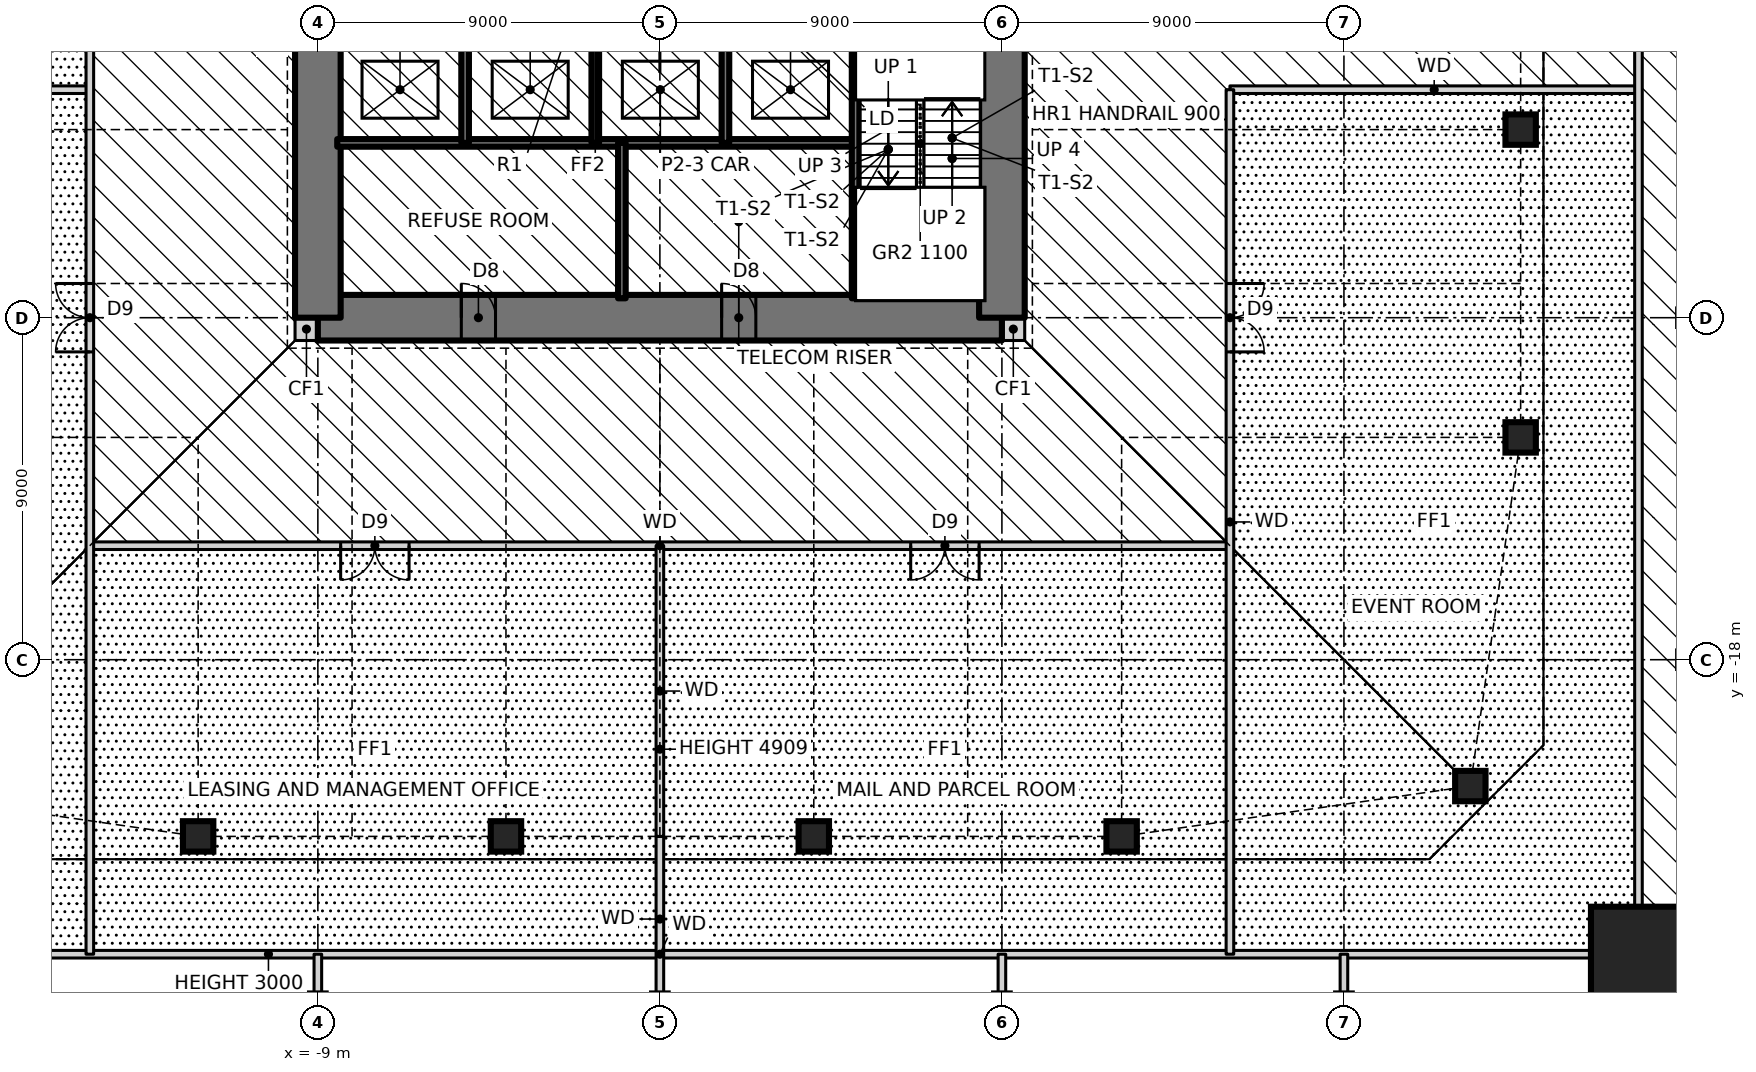
"""IFC4 building model, lengths in metres.
Left out: names, types, materials, properties, quantities, classifications, styles, units other than length and angle.
Written with IfcOpenShell. Run it as: python <this file> out.ifc"""

import sys

from ifc_helpers import new_model, si_unit, direction, frame, frame_2d, origin, origin_2d, place, context, subcontext, project, spatial, rectangle, hollow_rectangle, i_section, extrude, element, fill, save


model = new_model("IFC4")
c1 = context("Model", 3, precision=1e-05, world=origin(), true_north=direction((0.0, 1.0)))
c2 = subcontext(c1, "Body", "Model", "MODEL_VIEW")
j1 = project(units=[si_unit("LENGTHUNIT", "METRE"), si_unit("PLANEANGLEUNIT", "RADIAN")], contexts=[c1])
p1 = place(None, origin())
s1 = spatial("IfcSite", under=j1, at=p1, CompositionType="ELEMENT")
p2 = place(p1, origin())
s2 = spatial("IfcBuilding", under=s1, at=p2, CompositionType="ELEMENT")
p3 = place(p2, origin())
s3 = spatial("IfcBuildingStorey", under=s2, at=p3, CompositionType="ELEMENT", Elevation=0.0)
for number, where, z_axis, x_axis in (
    (1, (-12.15, -22.65, 0.0), (0.0, 0.0, 1.0), (1.0, 0.0, 0.0)),
    (2, (-4.05, -22.65, 0.0), (0.0, 0.0, 1.0), (1.0, 0.0, 0.0)),
    (3, (4.05, -22.65, 0.0), (0.0, 0.0, 1.0), (1.0, 0.0, 0.0)),
    (4, (12.15, -22.65, 0.0), (0.0, 0.0, 1.0), (1.0, 0.0, 0.0)),
    (5, (21.326, -21.326, 0.0), (0.0, 0.0, 1.0), (1.0, 0.0, 0.0)),
    (6, (22.65, -12.15, 0.0), (0.0, 0.0, 1.0), (1.0, 0.0, 0.0)),
    (7, (22.65, -4.05, 0.0), (0.0, 0.0, 1.0), (1.0, 0.0, 0.0)),
):
    element("IfcColumn", number, at=place(p3, frame(where, z_axis=z_axis, x_axis=x_axis)), inside=s3, PredefinedType="COLUMN", context=c2, shape_type="SweptSolid", body=[
        extrude(hollow_rectangle(XDim=0.8, YDim=0.8, WallThickness=0.09, at=origin_2d()), origin(), (0.0, 0.0, 1.0), 6.0),
    ])
p4 = place(p3, frame((27.0, -27.0, 0.0), z_axis=(0.0, 0.0, 1.0), x_axis=(1.0, 0.0, 0.0)))
e8 = element("IfcColumn", 8, at=p4, inside=s3, PredefinedType="COLUMN", context=c2, shape_type="SweptSolid", body=[
    extrude(rectangle(XDim=5.0, YDim=5.0, at=origin_2d()), origin(), (0.0, 0.0, 1.0), 6.0),
    extrude(i_section(OverallWidth=0.478, OverallDepth=0.599, WebThickness=0.1, FlangeThickness=0.14, at=origin_2d()), origin(), (0.0, 0.0, 1.0), 6.0),
])
for number, where, z_axis, x_axis in (
    (9, (-9.6, -9.3, 0.0), (0.0, 0.0, 1.0), (1.0, 0.0, 0.0)),
    (10, (9.0, -9.3, 0.0), (0.0, 0.0, 1.0), (1.0, 0.0, 0.0)),
):
    element("IfcWall", number, at=place(p3, frame(where, z_axis=z_axis, x_axis=x_axis)), inside=s3, PredefinedType="SOLIDWALL", context=c2, shape_type="SweptSolid", body=[
        extrude(rectangle(XDim=0.6, YDim=0.6, at=frame_2d((0.3, 0.0))), origin(), (0.0, 0.0, 1.0), 6.0),
    ])
p5 = place(p3, frame((-9.0, -9.0, 0.0), z_axis=(0.0, 0.0, 1.0), x_axis=(1.0, 0.0, 0.0)))
e11 = element("IfcWall", 11, at=p5, inside=s3, PredefinedType="SHEAR", context=c2, shape_type="SweptSolid", body=[
    extrude(rectangle(XDim=18.0, YDim=1.2, at=frame_2d((9.0, 0.0))), origin(), (0.0, 0.0, 1.0), 6.0),
])
p6 = place(p5, frame((3.775, 0.0, 0.0)))
e12 = element("IfcOpeningElement", 12, at=p6, cuts=e11, PredefinedType="OPENING", context=c2, shape_type="SweptSolid", body=[
    extrude(rectangle(XDim=0.9, YDim=2.1, at=frame_2d((0.45, 1.05))), frame((0.0, 0.61, 0.0), z_axis=(0.0, -1.0, 0.0), x_axis=(1.0, 0.0, 0.0)), (0.0, 0.0, 1.0), 1.22),
])
p7 = place(p5, frame((10.625, 0.0, 0.0)))
e13 = element("IfcOpeningElement", 13, at=p7, cuts=e11, PredefinedType="OPENING", context=c2, shape_type="SweptSolid", body=[
    extrude(rectangle(XDim=0.9, YDim=2.1, at=frame_2d((0.45, 1.05))), frame((0.0, 0.61, 0.0), z_axis=(0.0, -1.0, 0.0), x_axis=(1.0, 0.0, 0.0)), (0.0, 0.0, 1.0), 1.22),
])
p8 = place(p3, frame((9.0, -9.0, 0.0), z_axis=(0.0, 0.0, 1.0), x_axis=(0.0, 1.0, 0.0)))
e14 = element("IfcWall", 14, at=p8, inside=s3, PredefinedType="SHEAR", context=c2, shape_type="SweptSolid", body=[
    extrude(rectangle(XDim=18.0, YDim=1.2, at=frame_2d((9.0, 0.0))), origin(), (0.0, 0.0, 1.0), 6.0),
])
p9 = place(p8, frame((8.5, 0.0, 0.0)))
e15 = element("IfcOpeningElement", 15, at=p9, cuts=e14, PredefinedType="OPENING", context=c2, shape_type="SweptSolid", body=[
    extrude(rectangle(XDim=1.0, YDim=2.1, at=frame_2d((0.5, 1.05))), frame((0.0, 0.61, 0.0), z_axis=(0.0, -1.0, 0.0), x_axis=(1.0, 0.0, 0.0)), (0.0, 0.0, 1.0), 1.22),
])
p10 = place(p3, frame((-9.0, 9.0, 0.0), z_axis=(0.0, 0.0, 1.0), x_axis=(0.0, -1.0, 0.0)))
e16 = element("IfcWall", 16, at=p10, inside=s3, PredefinedType="SHEAR", context=c2, shape_type="SweptSolid", body=[
    extrude(rectangle(XDim=18.0, YDim=1.2, at=frame_2d((9.0, 0.0))), origin(), (0.0, 0.0, 1.0), 6.0),
])
p11 = place(p10, frame((8.5, 0.0, 0.0)))
e17 = element("IfcOpeningElement", 17, at=p11, cuts=e16, PredefinedType="OPENING", context=c2, shape_type="SweptSolid", body=[
    extrude(rectangle(XDim=1.0, YDim=2.1, at=frame_2d((0.5, 1.05))), frame((0.0, 0.61, 0.0), z_axis=(0.0, -1.0, 0.0), x_axis=(1.0, 0.0, 0.0)), (0.0, 0.0, 1.0), 1.22),
])
p12 = place(p3, frame((-25.75, -25.75, 0.0), z_axis=(0.0, 0.0, 1.0), x_axis=(1.0, 0.0, 0.0)))
e18 = element("IfcWall", 18, at=p12, inside=s3, PredefinedType="SOLIDWALL", context=c2, shape_type="SweptSolid", body=[
    extrude(rectangle(XDim=51.5, YDim=0.2, at=frame_2d((25.75, 0.0))), origin(), (0.0, 0.0, 1.0), 3.0),
])
p13 = place(p3, frame((-15.0, -15.0, 0.0), z_axis=(0.0, 0.0, 1.0), x_axis=(1.0, 0.0, 0.0)))
e19 = element("IfcWall", 19, at=p13, inside=s3, PredefinedType="SOLIDWALL", context=c2, shape_type="SweptSolid", body=[
    extrude(rectangle(XDim=30.0, YDim=0.2, at=frame_2d((15.0, 0.0))), origin(), (0.0, 0.0, 1.0), 5.75),
])
p14 = place(p13, frame((6.6, 0.0, 0.0)))
e20 = element("IfcOpeningElement", 20, at=p14, cuts=e19, PredefinedType="OPENING", context=c2, shape_type="SweptSolid", body=[
    extrude(rectangle(XDim=1.8, YDim=2.1, at=frame_2d((0.9, 1.05))), frame((0.0, 0.11, 0.0), z_axis=(0.0, -1.0, 0.0), x_axis=(1.0, 0.0, 0.0)), (0.0, 0.0, 1.0), 0.22),
])
p15 = place(p13, frame((21.6, 0.0, 0.0)))
e21 = element("IfcOpeningElement", 21, at=p15, cuts=e19, PredefinedType="OPENING", context=c2, shape_type="SweptSolid", body=[
    extrude(rectangle(XDim=1.8, YDim=2.1, at=frame_2d((0.9, 1.05))), frame((0.0, 0.11, 0.0), z_axis=(0.0, -1.0, 0.0), x_axis=(1.0, 0.0, 0.0)), (0.0, 0.0, 1.0), 0.22),
])
p16 = place(p3, frame((-8.49, -4.4, 0.0), z_axis=(0.0, 0.0, 1.0), x_axis=(1.0, 0.0, 0.0)))
e22 = element("IfcWall", 22, at=p16, inside=s3, PredefinedType="SOLIDWALL", context=c2, shape_type="SweptSolid", body=[
    extrude(rectangle(XDim=13.64, YDim=0.2, at=frame_2d((6.82, 0.0))), origin(), (0.0, 0.0, 1.0), 6.0),
])
for number, where, z_axis, x_axis in (
    (23, (-25.75, -3.0, 0.0), (0.0, 0.0, 1.0), (1.0, 0.0, 0.0)),
    (24, (15.0, -3.0, 0.0), (0.0, 0.0, 1.0), (1.0, 0.0, 0.0)),
):
    element("IfcWall", number, at=place(p3, frame(where, z_axis=z_axis, x_axis=x_axis)), inside=s3, PredefinedType="SOLIDWALL", context=c2, shape_type="SweptSolid", body=[
        extrude(rectangle(XDim=10.75, YDim=0.2, at=frame_2d((5.375, 0.0))), origin(), (0.0, 0.0, 1.0), 5.75),
    ])
p17 = place(p3, frame((25.75, -32.6, 0.0), z_axis=(0.0, 0.0, 1.0), x_axis=(0.0, 1.0, 0.0)))
e25 = element("IfcWall", 25, at=p17, inside=s3, PredefinedType="SOLIDWALL", context=c2, shape_type="SweptSolid", body=[
    extrude(rectangle(XDim=65.2, YDim=0.2, at=frame_2d((32.6, 0.0))), origin(), (0.0, 0.0, 1.0), 5.75),
])
p18 = place(p17, frame((31.2, 0.0, 0.0)))
e26 = element("IfcOpeningElement", 26, at=p18, cuts=e25, PredefinedType="OPENING", context=c2, shape_type="SweptSolid", body=[
    extrude(rectangle(XDim=1.8, YDim=2.4, at=frame_2d((0.9, 1.2))), frame((0.0, 0.11, 0.0), z_axis=(0.0, -1.0, 0.0), x_axis=(1.0, 0.0, 0.0)), (0.0, 0.0, 1.0), 0.22),
])
p19 = place(p3, frame((18.0, -35.94, 0.0), z_axis=(0.0, 0.0, 1.0), x_axis=(0.0, 1.0, 0.0)))
e27 = element("IfcWall", 27, at=p19, inside=s3, PredefinedType="SOLIDWALL", context=c2, shape_type="SweptSolid", body=[
    extrude(rectangle(XDim=10.19, YDim=0.2, at=frame_2d((5.095, 0.0))), origin(), (0.0, 0.0, 1.0), 4.98),
])
p20 = place(p3, frame((15.0, -25.75, 0.0), z_axis=(0.0, 0.0, 1.0), x_axis=(0.0, 1.0, 0.0)))
e28 = element("IfcWall", 28, at=p20, inside=s3, PredefinedType="SOLIDWALL", context=c2, shape_type="SweptSolid", body=[
    extrude(rectangle(XDim=22.75, YDim=0.2, at=frame_2d((11.375, 0.0))), origin(), (0.0, 0.0, 1.0), 5.75),
])
p21 = place(p20, frame((15.85, 0.0, 0.0)))
e29 = element("IfcOpeningElement", 29, at=p21, cuts=e28, PredefinedType="OPENING", context=c2, shape_type="SweptSolid", body=[
    extrude(rectangle(XDim=1.8, YDim=2.1, at=frame_2d((0.9, 1.05))), frame((0.0, 0.11, 0.0), z_axis=(0.0, -1.0, 0.0), x_axis=(1.0, 0.0, 0.0)), (0.0, 0.0, 1.0), 0.22),
])
p22 = place(p3, frame((9.0, -35.94, 0.0), z_axis=(0.0, 0.0, 1.0), x_axis=(0.0, 1.0, 0.0)))
e30 = element("IfcWall", 30, at=p22, inside=s3, PredefinedType="SOLIDWALL", context=c2, shape_type="SweptSolid", body=[
    extrude(rectangle(XDim=10.19, YDim=0.2, at=frame_2d((5.095, 0.0))), origin(), (0.0, 0.0, 1.0), 4.98),
])
p23 = place(p3, frame((5.15, -8.49, 0.0), z_axis=(0.0, 0.0, 1.0), x_axis=(0.0, 1.0, 0.0)))
e31 = element("IfcWall", 31, at=p23, inside=s3, PredefinedType="SOLIDWALL", context=c2, shape_type="SweptSolid", body=[
    extrude(rectangle(XDim=13.09, YDim=0.2, at=frame_2d((6.545, 0.0))), origin(), (0.0, 0.0, 1.0), 6.0),
])
p24 = place(p23, frame((7.89, 0.0, 0.0)))
e32 = element("IfcOpeningElement", 32, at=p24, cuts=e31, PredefinedType="OPENING", context=c2, shape_type="SweptSolid", body=[
    extrude(rectangle(XDim=1.2, YDim=2.1, at=frame_2d((0.6, 1.05))), frame((0.0, 0.11, 0.0), z_axis=(0.0, -1.0, 0.0), x_axis=(1.0, 0.0, 0.0)), (0.0, 0.0, 1.0), 0.22),
])
p25 = place(p3, frame((1.725, -4.4, 0.0), z_axis=(0.0, 0.0, 1.0), x_axis=(0.0, 1.0, 0.0)))
e33 = element("IfcWall", 33, at=p25, inside=s3, PredefinedType="SOLIDWALL", context=c2, shape_type="SweptSolid", body=[
    extrude(rectangle(XDim=2.8, YDim=0.2, at=frame_2d((1.4, 0.0))), origin(), (0.0, 0.0, 1.0), 6.0),
])
p26 = place(p3, frame((-1.0, -8.49, 0.0), z_axis=(0.0, 0.0, 1.0), x_axis=(0.0, 1.0, 0.0)))
e34 = element("IfcWall", 34, at=p26, inside=s3, PredefinedType="SOLIDWALL", context=c2, shape_type="SweptSolid", body=[
    extrude(rectangle(XDim=4.09, YDim=0.2, at=frame_2d((2.045, 0.0))), origin(), (0.0, 0.0, 1.0), 6.0),
])
for number, where, z_axis, x_axis in (
    (35, (-1.7, -4.4, 0.0), (0.0, 0.0, 1.0), (0.0, 1.0, 0.0)),
    (36, (-5.125, -4.4, 0.0), (0.0, 0.0, 1.0), (0.0, 1.0, 0.0)),
):
    element("IfcWall", number, at=place(p3, frame(where, z_axis=z_axis, x_axis=x_axis)), inside=s3, PredefinedType="SOLIDWALL", context=c2, shape_type="SweptSolid", body=[
        extrude(rectangle(XDim=2.8, YDim=0.2, at=frame_2d((1.4, 0.0))), origin(), (0.0, 0.0, 1.0), 6.0),
    ])
p27 = place(p3, frame((-9.0, -35.94, 0.0), z_axis=(0.0, 0.0, 1.0), x_axis=(0.0, 1.0, 0.0)))
e37 = element("IfcWall", 37, at=p27, inside=s3, PredefinedType="SOLIDWALL", context=c2, shape_type="SweptSolid", body=[
    extrude(rectangle(XDim=10.19, YDim=0.2, at=frame_2d((5.095, 0.0))), origin(), (0.0, 0.0, 1.0), 4.98),
])
p28 = place(p3, frame((-15.0, -25.75, 0.0), z_axis=(0.0, 0.0, 1.0), x_axis=(0.0, 1.0, 0.0)))
e38 = element("IfcWall", 38, at=p28, inside=s3, PredefinedType="SOLIDWALL", context=c2, shape_type="SweptSolid", body=[
    extrude(rectangle(XDim=51.5, YDim=0.2, at=frame_2d((25.75, 0.0))), origin(), (0.0, 0.0, 1.0), 5.75),
])
p29 = place(p28, frame((33.85, 0.0, 0.0)))
e39 = element("IfcOpeningElement", 39, at=p29, cuts=e38, PredefinedType="OPENING", context=c2, shape_type="SweptSolid", body=[
    extrude(rectangle(XDim=1.8, YDim=2.1, at=frame_2d((0.9, 1.05))), frame((0.0, 0.11, 0.0), z_axis=(0.0, -1.0, 0.0), x_axis=(1.0, 0.0, 0.0)), (0.0, 0.0, 1.0), 0.22),
])
p30 = place(p28, frame((24.85, 0.0, 0.0)))
e40 = element("IfcOpeningElement", 40, at=p30, cuts=e38, PredefinedType="OPENING", context=c2, shape_type="SweptSolid", body=[
    extrude(rectangle(XDim=1.8, YDim=2.1, at=frame_2d((0.9, 1.05))), frame((0.0, 0.11, 0.0), z_axis=(0.0, -1.0, 0.0), x_axis=(1.0, 0.0, 0.0)), (0.0, 0.0, 1.0), 0.22),
])
p31 = place(p28, frame((15.85, 0.0, 0.0)))
e41 = element("IfcOpeningElement", 41, at=p31, cuts=e38, PredefinedType="OPENING", context=c2, shape_type="SweptSolid", body=[
    extrude(rectangle(XDim=1.8, YDim=2.1, at=frame_2d((0.9, 1.05))), frame((0.0, 0.11, 0.0), z_axis=(0.0, -1.0, 0.0), x_axis=(1.0, 0.0, 0.0)), (0.0, 0.0, 1.0), 0.22),
])
p32 = place(p3, frame((0.0, -27.0, 0.0), z_axis=(0.0, 0.0, 1.0), x_axis=(0.0, 1.0, 0.0)))
e42 = element("IfcWall", 42, at=p32, inside=s3, PredefinedType="SOLIDWALL", context=c2, shape_type="SweptSolid", body=[
    extrude(rectangle(XDim=4.35, YDim=0.2, at=frame_2d((2.175, 0.0))), origin(), (0.0, 0.0, 1.0), 5.75),
])
p33 = place(p3, frame((0.0, -22.65, 0.0), z_axis=(0.0, 0.0, 1.0), x_axis=(0.0, 1.0, 0.0)))
e43 = element("IfcWall", 43, at=p33, inside=s3, PredefinedType="SOLIDWALL", context=c2, shape_type="SweptSolid", body=[
    extrude(rectangle(XDim=7.65, YDim=0.2, at=frame_2d((3.825, 0.0))), origin(), (0.0, 0.0, 1.0), 4.909),
])
p34 = place(p21, frame((1.8, 0.0, 0.0), z_axis=(0.0, 0.0, 1.0), x_axis=(-1.0, 0.0, 0.0)))
e44 = element("IfcDoor", 44, at=p34, inside=s3, OperationType="DOUBLE_DOOR_SINGLE_SWING", PredefinedType="DOOR", context=c2, shape_type="SweptSolid", body=[
    extrude(rectangle(XDim=1.8, YDim=2.1, at=frame_2d((0.9, 1.05))), frame((0.0, 0.025, 0.0), z_axis=(0.0, -1.0, 0.0), x_axis=(1.0, 0.0, 0.0)), (0.0, 0.0, 1.0), 0.05),
])
fill(e29, e44)
p35 = place(p31, origin())
e45 = element("IfcDoor", 45, at=p35, inside=s3, OperationType="DOUBLE_DOOR_SINGLE_SWING", PredefinedType="DOOR", context=c2, shape_type="SweptSolid", body=[
    extrude(rectangle(XDim=1.8, YDim=2.1, at=frame_2d((0.9, 1.05))), frame((0.0, 0.025, 0.0), z_axis=(0.0, -1.0, 0.0), x_axis=(1.0, 0.0, 0.0)), (0.0, 0.0, 1.0), 0.05),
])
fill(e41, e45)
p36 = place(p14, frame((1.8, 0.0, 0.0), z_axis=(0.0, 0.0, 1.0), x_axis=(-1.0, 0.0, 0.0)))
e46 = element("IfcDoor", 46, at=p36, inside=s3, OperationType="DOUBLE_DOOR_SINGLE_SWING", PredefinedType="DOOR", context=c2, shape_type="SweptSolid", body=[
    extrude(rectangle(XDim=1.8, YDim=2.1, at=frame_2d((0.9, 1.05))), frame((0.0, 0.025, 0.0), z_axis=(0.0, -1.0, 0.0), x_axis=(1.0, 0.0, 0.0)), (0.0, 0.0, 1.0), 0.05),
])
fill(e20, e46)
p37 = place(p15, frame((1.8, 0.0, 0.0), z_axis=(0.0, 0.0, 1.0), x_axis=(-1.0, 0.0, 0.0)))
e47 = element("IfcDoor", 47, at=p37, inside=s3, OperationType="DOUBLE_DOOR_SINGLE_SWING", PredefinedType="DOOR", context=c2, shape_type="SweptSolid", body=[
    extrude(rectangle(XDim=1.8, YDim=2.1, at=frame_2d((0.9, 1.05))), frame((0.0, 0.025, 0.0), z_axis=(0.0, -1.0, 0.0), x_axis=(1.0, 0.0, 0.0)), (0.0, 0.0, 1.0), 0.05),
])
fill(e21, e47)
p38 = place(p6, origin())
e48 = element("IfcDoor", 48, at=p38, inside=s3, OperationType="SINGLE_SWING_LEFT", PredefinedType="DOOR", context=c2, shape_type="SweptSolid", body=[
    extrude(rectangle(XDim=0.9, YDim=2.1, at=frame_2d((0.45, 1.05))), frame((0.0, 0.025, 0.0), z_axis=(0.0, -1.0, 0.0), x_axis=(1.0, 0.0, 0.0)), (0.0, 0.0, 1.0), 0.05),
])
fill(e12, e48)
p39 = place(p7, origin())
e49 = element("IfcDoor", 49, at=p39, inside=s3, OperationType="SINGLE_SWING_LEFT", PredefinedType="DOOR", context=c2, shape_type="SweptSolid", body=[
    extrude(rectangle(XDim=0.9, YDim=2.1, at=frame_2d((0.45, 1.05))), frame((0.0, 0.025, 0.0), z_axis=(0.0, -1.0, 0.0), x_axis=(1.0, 0.0, 0.0)), (0.0, 0.0, 1.0), 0.05),
])
fill(e13, e49)
save(model, sys.argv[1])
